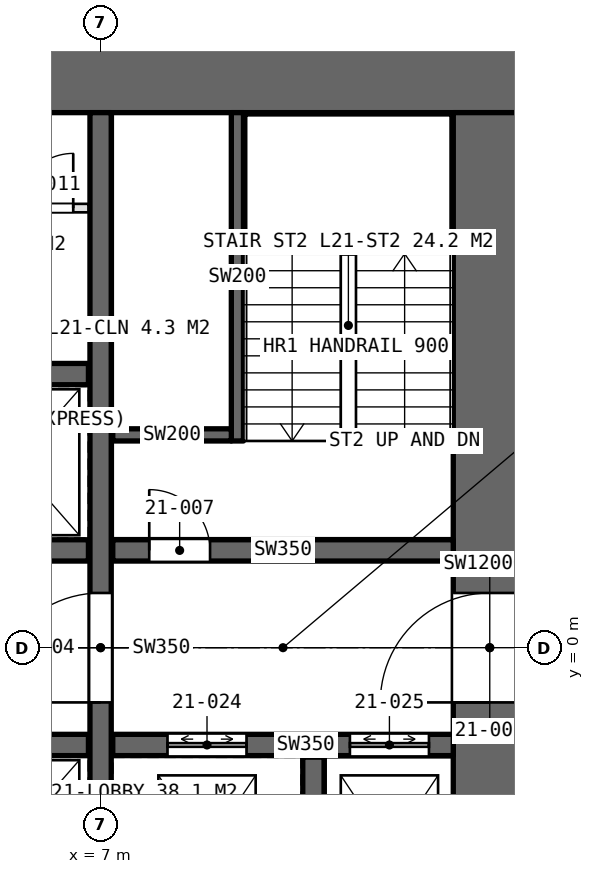
"""IFC4 building model, lengths in metres.
Left out: names, types, materials, properties, quantities, classifications, styles, units other than length and angle.
Written with IfcOpenShell. Run it as: python <this file> out.ifc"""

import sys

from ifc_helpers import new_model, si_unit, direction, frame, frame_2d, origin, place, context, subcontext, project, spatial, rectangle, extrude, element, fill, save


model = new_model("IFC4")
c1 = context("Model", 3, precision=1e-05, world=origin(), true_north=direction((0.0, 1.0)))
c2 = subcontext(c1, "Body", "Model", "MODEL_VIEW")
j1 = project(units=[si_unit("LENGTHUNIT", "METRE"), si_unit("PLANEANGLEUNIT", "RADIAN")], contexts=[c1])
p1 = place(None, origin())
s1 = spatial("IfcSite", under=j1, at=p1, CompositionType="ELEMENT")
p2 = place(p1, origin())
s2 = spatial("IfcBuilding", under=s1, at=p2, CompositionType="ELEMENT")
p3 = place(p2, frame((0.0, 0.0, 105.0)))
s3 = spatial("IfcBuildingStorey", under=s2, at=p3, CompositionType="ELEMENT", Elevation=105.0)
p4 = place(p3, frame((14.0, 9.4, 0.0), z_axis=(0.0, 0.0, 1.0), x_axis=(-1.0, 0.0, 0.0)))
e1 = element("IfcWall", 1, at=p4, inside=s3, PredefinedType="SHEAR", context=c2, shape_type="SweptSolid", body=[
    extrude(rectangle(XDim=28.0, YDim=1.2, at=frame_2d((14.0, 0.0))), origin(), (0.0, 0.0, 1.0), 4.2),
])
p5 = place(p4, frame((24.0, 0.0, 0.0)))
e2 = element("IfcOpeningElement", 2, at=p5, cuts=e1, PredefinedType="OPENING", context=c2, shape_type="SweptSolid", body=[
    extrude(rectangle(XDim=1.0, YDim=2.4, at=frame_2d((0.5, 1.2))), frame((0.0, 0.61, 0.0), z_axis=(0.0, -1.0, 0.0), x_axis=(1.0, 0.0, 0.0)), (0.0, 0.0, 1.0), 1.22),
])
p6 = place(p4, frame((13.1, 0.0, 0.0)))
e3 = element("IfcOpeningElement", 3, at=p6, cuts=e1, PredefinedType="OPENING", context=c2, shape_type="SweptSolid", body=[
    extrude(rectangle(XDim=1.8, YDim=2.4, at=frame_2d((0.9, 1.2))), frame((0.0, 0.61, 0.0), z_axis=(0.0, -1.0, 0.0), x_axis=(1.0, 0.0, 0.0)), (0.0, 0.0, 1.0), 1.22),
])
p7 = place(p3, frame((13.4, -8.8, 0.0), z_axis=(0.0, 0.0, 1.0), x_axis=(0.0, 1.0, 0.0)))
e4 = element("IfcWall", 4, at=p7, inside=s3, PredefinedType="SHEAR", context=c2, shape_type="SweptSolid", body=[
    extrude(rectangle(XDim=17.6, YDim=1.2, at=frame_2d((8.8, 0.0))), origin(), (0.0, 0.0, 1.0), 4.2),
])
p8 = place(p7, frame((7.9, 0.0, 0.0)))
e5 = element("IfcOpeningElement", 5, at=p8, cuts=e4, PredefinedType="OPENING", context=c2, shape_type="SweptSolid", body=[
    extrude(rectangle(XDim=1.8, YDim=2.4, at=frame_2d((0.9, 1.2))), frame((0.0, 0.61, 0.0), z_axis=(0.0, -1.0, 0.0), x_axis=(1.0, 0.0, 0.0)), (0.0, 0.0, 1.0), 1.22),
])
p9 = place(p3, frame((7.0, -8.8, 0.0), z_axis=(0.0, 0.0, 1.0), x_axis=(0.0, 1.0, 0.0)))
e6 = element("IfcWall", 6, at=p9, inside=s3, PredefinedType="SHEAR", context=c2, shape_type="SweptSolid", body=[
    extrude(rectangle(XDim=17.6, YDim=0.35, at=frame_2d((8.8, 0.0))), origin(), (0.0, 0.0, 1.0), 4.2),
])
p10 = place(p9, frame((7.9, 0.0, 0.0)))
e7 = element("IfcOpeningElement", 7, at=p10, cuts=e6, PredefinedType="OPENING", context=c2, shape_type="SweptSolid", body=[
    extrude(rectangle(XDim=1.8, YDim=2.4, at=frame_2d((0.9, 1.2))), frame((0.0, 0.185, 0.0), z_axis=(0.0, -1.0, 0.0), x_axis=(1.0, 0.0, 0.0)), (0.0, 0.0, 1.0), 0.37),
])
p11 = place(p3, frame((-6.8, 1.6, 0.0), z_axis=(0.0, 0.0, 1.0), x_axis=(1.0, 0.0, 0.0)))
e8 = element("IfcWall", 8, at=p11, inside=s3, PredefinedType="SHEAR", context=c2, shape_type="SweptSolid", body=[
    extrude(rectangle(XDim=13.6, YDim=0.35, at=frame_2d((6.8, 0.0))), origin(), (0.0, 0.0, 1.0), 4.2),
])
p12 = place(p11, frame((1.365, 0.0, 0.0)))
e9 = element("IfcOpeningElement", 9, at=p12, cuts=e8, PredefinedType="OPENING", context=c2, shape_type="SweptSolid", body=[
    extrude(rectangle(XDim=1.0, YDim=2.4, at=frame_2d((0.5, 1.2))), frame((0.0, 0.185, 0.0), z_axis=(0.0, -1.0, 0.0), x_axis=(1.0, 0.0, 0.0)), (0.0, 0.0, 1.0), 0.37),
])
p13 = place(p11, frame((5.15, 0.0, 0.0)))
e10 = element("IfcOpeningElement", 10, at=p13, cuts=e8, PredefinedType="OPENING", context=c2, shape_type="SweptSolid", body=[
    extrude(rectangle(XDim=0.9, YDim=2.4, at=frame_2d((0.45, 1.2))), frame((0.0, 0.185, 0.0), z_axis=(0.0, -1.0, 0.0), x_axis=(1.0, 0.0, 0.0)), (0.0, 0.0, 1.0), 0.37),
])
p14 = place(p11, frame((8.635, 0.0, 0.0)))
e11 = element("IfcOpeningElement", 11, at=p14, cuts=e8, PredefinedType="OPENING", context=c2, shape_type="SweptSolid", body=[
    extrude(rectangle(XDim=1.0, YDim=2.4, at=frame_2d((0.5, 1.2))), frame((0.0, 0.185, 0.0), z_axis=(0.0, -1.0, 0.0), x_axis=(1.0, 0.0, 0.0)), (0.0, 0.0, 1.0), 0.37),
])
p15 = place(p3, frame((-6.8, -1.6, 0.0), z_axis=(0.0, 0.0, 1.0), x_axis=(1.0, 0.0, 0.0)))
e12 = element("IfcWall", 12, at=p15, inside=s3, PredefinedType="SHEAR", context=c2, shape_type="SweptSolid", body=[
    extrude(rectangle(XDim=13.6, YDim=0.35, at=frame_2d((6.8, 0.0))), origin(), (0.0, 0.0, 1.0), 4.2),
])
p16 = place(p15, frame((0.7, 0.0, 0.0)))
e13 = element("IfcOpeningElement", 13, at=p16, cuts=e12, PredefinedType="OPENING", context=c2, shape_type="SweptSolid", body=[
    extrude(rectangle(XDim=1.1, YDim=2.4, at=frame_2d((0.55, 1.2))), frame((0.0, 0.185, 0.0), z_axis=(0.0, -1.0, 0.0), x_axis=(1.0, 0.0, 0.0)), (0.0, 0.0, 1.0), 0.37),
])
p17 = place(p15, frame((3.5, 0.0, 0.0)))
e14 = element("IfcOpeningElement", 14, at=p17, cuts=e12, PredefinedType="OPENING", context=c2, shape_type="SweptSolid", body=[
    extrude(rectangle(XDim=1.1, YDim=2.4, at=frame_2d((0.55, 1.2))), frame((0.0, 0.185, 0.0), z_axis=(0.0, -1.0, 0.0), x_axis=(1.0, 0.0, 0.0)), (0.0, 0.0, 1.0), 0.37),
])
p18 = place(p15, frame((6.3, 0.0, 0.0)))
e15 = element("IfcOpeningElement", 15, at=p18, cuts=e12, PredefinedType="OPENING", context=c2, shape_type="SweptSolid", body=[
    extrude(rectangle(XDim=1.1, YDim=2.4, at=frame_2d((0.55, 1.2))), frame((0.0, 0.185, 0.0), z_axis=(0.0, -1.0, 0.0), x_axis=(1.0, 0.0, 0.0)), (0.0, 0.0, 1.0), 0.37),
])
p19 = place(p15, frame((9.1, 0.0, 0.0)))
e16 = element("IfcOpeningElement", 16, at=p19, cuts=e12, PredefinedType="OPENING", context=c2, shape_type="SweptSolid", body=[
    extrude(rectangle(XDim=1.1, YDim=2.4, at=frame_2d((0.55, 1.2))), frame((0.0, 0.185, 0.0), z_axis=(0.0, -1.0, 0.0), x_axis=(1.0, 0.0, 0.0)), (0.0, 0.0, 1.0), 0.37),
])
p20 = place(p3, frame((-6.8, 4.5, 0.0), z_axis=(0.0, 0.0, 1.0), x_axis=(1.0, 0.0, 0.0)))
e17 = element("IfcWall", 17, at=p20, inside=s3, PredefinedType="SHEAR", context=c2, shape_type="SweptSolid", body=[
    extrude(rectangle(XDim=13.6, YDim=0.35, at=frame_2d((6.8, 0.0))), origin(), (0.0, 0.0, 1.0), 4.2),
])
p21 = place(p3, frame((7.2, 1.6, 0.0), z_axis=(0.0, 0.0, 1.0), x_axis=(1.0, 0.0, 0.0)))
e18 = element("IfcWall", 18, at=p21, inside=s3, PredefinedType="SHEAR", context=c2, shape_type="SweptSolid", body=[
    extrude(rectangle(XDim=5.6, YDim=0.35, at=frame_2d((2.8, 0.0))), origin(), (0.0, 0.0, 1.0), 4.2),
])
p22 = place(p21, frame((0.6, 0.0, 0.0)))
e19 = element("IfcOpeningElement", 19, at=p22, cuts=e18, PredefinedType="OPENING", context=c2, shape_type="SweptSolid", body=[
    extrude(rectangle(XDim=1.0, YDim=2.4, at=frame_2d((0.5, 1.2))), frame((0.0, 0.185, 0.0), z_axis=(0.0, -1.0, 0.0), x_axis=(1.0, 0.0, 0.0)), (0.0, 0.0, 1.0), 0.37),
])
p23 = place(p3, frame((7.2, -1.6, 0.0), z_axis=(0.0, 0.0, 1.0), x_axis=(1.0, 0.0, 0.0)))
e20 = element("IfcWall", 20, at=p23, inside=s3, PredefinedType="SHEAR", context=c2, shape_type="SweptSolid", body=[
    extrude(rectangle(XDim=5.6, YDim=0.35, at=frame_2d((2.8, 0.0))), origin(), (0.0, 0.0, 1.0), 4.2),
])
p24 = place(p23, frame((0.9, 0.0, 0.0)))
e21 = element("IfcOpeningElement", 21, at=p24, cuts=e20, PredefinedType="OPENING", context=c2, shape_type="SweptSolid", body=[
    extrude(rectangle(XDim=1.3, YDim=2.4, at=frame_2d((0.65, 1.2))), frame((0.0, 0.185, 0.0), z_axis=(0.0, -1.0, 0.0), x_axis=(1.0, 0.0, 0.0)), (0.0, 0.0, 1.0), 0.37),
])
p25 = place(p23, frame((3.9, 0.0, 0.0)))
e22 = element("IfcOpeningElement", 22, at=p25, cuts=e20, PredefinedType="OPENING", context=c2, shape_type="SweptSolid", body=[
    extrude(rectangle(XDim=1.3, YDim=2.4, at=frame_2d((0.65, 1.2))), frame((0.0, 0.185, 0.0), z_axis=(0.0, -1.0, 0.0), x_axis=(1.0, 0.0, 0.0)), (0.0, 0.0, 1.0), 0.37),
])
p26 = place(p3, frame((10.5, -4.8, 0.0), z_axis=(0.0, 0.0, 1.0), x_axis=(0.0, 1.0, 0.0)))
e23 = element("IfcWall", 23, at=p26, inside=s3, PredefinedType="SHEAR", context=c2, shape_type="SweptSolid", body=[
    extrude(rectangle(XDim=3.0, YDim=0.35, at=frame_2d((1.5, 0.0))), origin(), (0.0, 0.0, 1.0), 4.2),
])
p27 = place(p3, frame((-6.8, 7.23, 0.0), z_axis=(0.0, 0.0, 1.0), x_axis=(1.0, 0.0, 0.0)))
e24 = element("IfcWall", 24, at=p27, inside=s3, PredefinedType="PARTITIONING", context=c2, shape_type="SweptSolid", body=[
    extrude(rectangle(XDim=13.6, YDim=0.14, at=frame_2d((6.8, 0.0))), origin(), (0.0, 0.0, 1.0), 3.95),
])
p28 = place(p27, frame((3.48, 0.0, 0.0)))
e25 = element("IfcOpeningElement", 25, at=p28, cuts=e24, PredefinedType="OPENING", context=c2, shape_type="SweptSolid", body=[
    extrude(rectangle(XDim=1.0, YDim=2.4, at=frame_2d((0.5, 1.2))), frame((0.0, 0.08, 0.0), z_axis=(0.0, -1.0, 0.0), x_axis=(1.0, 0.0, 0.0)), (0.0, 0.0, 1.0), 0.16),
])
p29 = place(p27, frame((7.98, 0.0, 0.0)))
e26 = element("IfcOpeningElement", 26, at=p29, cuts=e24, PredefinedType="OPENING", context=c2, shape_type="SweptSolid", body=[
    extrude(rectangle(XDim=1.0, YDim=2.4, at=frame_2d((0.5, 1.2))), frame((0.0, 0.08, 0.0), z_axis=(0.0, -1.0, 0.0), x_axis=(1.0, 0.0, 0.0)), (0.0, 0.0, 1.0), 0.16),
])
p30 = place(p27, frame((10.38, 0.0, 0.0)))
e27 = element("IfcOpeningElement", 27, at=p30, cuts=e24, PredefinedType="OPENING", context=c2, shape_type="SweptSolid", body=[
    extrude(rectangle(XDim=1.1, YDim=2.4, at=frame_2d((0.55, 1.2))), frame((0.0, 0.08, 0.0), z_axis=(0.0, -1.0, 0.0), x_axis=(1.0, 0.0, 0.0)), (0.0, 0.0, 1.0), 0.16),
])
p31 = place(p27, frame((12.45, 0.0, 0.0)))
e28 = element("IfcOpeningElement", 28, at=p31, cuts=e24, PredefinedType="OPENING", context=c2, shape_type="SweptSolid", body=[
    extrude(rectangle(XDim=0.9, YDim=2.4, at=frame_2d((0.45, 1.2))), frame((0.0, 0.08, 0.0), z_axis=(0.0, -1.0, 0.0), x_axis=(1.0, 0.0, 0.0)), (0.0, 0.0, 1.0), 0.16),
])
p32 = place(p3, frame((9.25, 3.4, 0.0), z_axis=(0.0, 0.0, 1.0), x_axis=(0.0, 1.0, 0.0)))
e29 = element("IfcWall", 29, at=p32, inside=s3, PredefinedType="SOLIDWALL", context=c2, shape_type="SweptSolid", body=[
    extrude(rectangle(XDim=5.4, YDim=0.2, at=frame_2d((2.7, 0.0))), origin(), (0.0, 0.0, 1.0), 4.2),
])
p33 = place(p3, frame((9.15, 3.5, 0.0), z_axis=(0.0, 0.0, 1.0), x_axis=(-1.0, 0.0, 0.0)))
e30 = element("IfcWall", 30, at=p33, inside=s3, PredefinedType="SOLIDWALL", context=c2, shape_type="SweptSolid", body=[
    extrude(rectangle(XDim=1.95, YDim=0.2, at=frame_2d((0.975, 0.0))), origin(), (0.0, 0.0, 1.0), 4.2),
])
p34 = place(p8, origin())
e31 = element("IfcDoor", 31, at=p34, inside=s3, OperationType="DOUBLE_DOOR_SINGLE_SWING", PredefinedType="DOOR", context=c2, shape_type="SweptSolid", body=[
    extrude(rectangle(XDim=1.8, YDim=2.4, at=frame_2d((0.9, 1.2))), frame((0.0, 0.025, 0.0), z_axis=(0.0, -1.0, 0.0), x_axis=(1.0, 0.0, 0.0)), (0.0, 0.0, 1.0), 0.05),
])
fill(e5, e31)
p35 = place(p10, origin())
e32 = element("IfcDoor", 32, at=p35, inside=s3, OperationType="DOUBLE_DOOR_SINGLE_SWING", PredefinedType="DOOR", context=c2, shape_type="SweptSolid", body=[
    extrude(rectangle(XDim=1.8, YDim=2.4, at=frame_2d((0.9, 1.2))), frame((0.0, 0.025, 0.0), z_axis=(0.0, -1.0, 0.0), x_axis=(1.0, 0.0, 0.0)), (0.0, 0.0, 1.0), 0.05),
])
fill(e7, e32)
p36 = place(p22, origin())
e33 = element("IfcDoor", 33, at=p36, inside=s3, OperationType="SINGLE_SWING_LEFT", PredefinedType="DOOR", context=c2, shape_type="SweptSolid", body=[
    extrude(rectangle(XDim=1.0, YDim=2.4, at=frame_2d((0.5, 1.2))), frame((0.0, 0.025, 0.0), z_axis=(0.0, -1.0, 0.0), x_axis=(1.0, 0.0, 0.0)), (0.0, 0.0, 1.0), 0.05),
])
fill(e19, e33)
p37 = place(p31, origin())
e34 = element("IfcDoor", 34, at=p37, inside=s3, OperationType="SINGLE_SWING_RIGHT", PredefinedType="DOOR", context=c2, shape_type="SweptSolid", body=[
    extrude(rectangle(XDim=0.9, YDim=2.4, at=frame_2d((0.45, 1.2))), frame((0.0, 0.025, 0.0), z_axis=(0.0, -1.0, 0.0), x_axis=(1.0, 0.0, 0.0)), (0.0, 0.0, 1.0), 0.05),
])
fill(e28, e34)
p38 = place(p24, origin())
e35 = element("IfcDoor", 35, at=p38, inside=s3, OperationType="DOUBLE_DOOR_SLIDING", PredefinedType="DOOR", context=c2, shape_type="SweptSolid", body=[
    extrude(rectangle(XDim=1.3, YDim=2.4, at=frame_2d((0.65, 1.2))), frame((0.0, 0.025, 0.0), z_axis=(0.0, -1.0, 0.0), x_axis=(1.0, 0.0, 0.0)), (0.0, 0.0, 1.0), 0.05),
])
fill(e21, e35)
p39 = place(p25, origin())
e36 = element("IfcDoor", 36, at=p39, inside=s3, OperationType="DOUBLE_DOOR_SLIDING", PredefinedType="DOOR", context=c2, shape_type="SweptSolid", body=[
    extrude(rectangle(XDim=1.3, YDim=2.4, at=frame_2d((0.65, 1.2))), frame((0.0, 0.025, 0.0), z_axis=(0.0, -1.0, 0.0), x_axis=(1.0, 0.0, 0.0)), (0.0, 0.0, 1.0), 0.05),
])
fill(e22, e36)
save(model, sys.argv[1])
